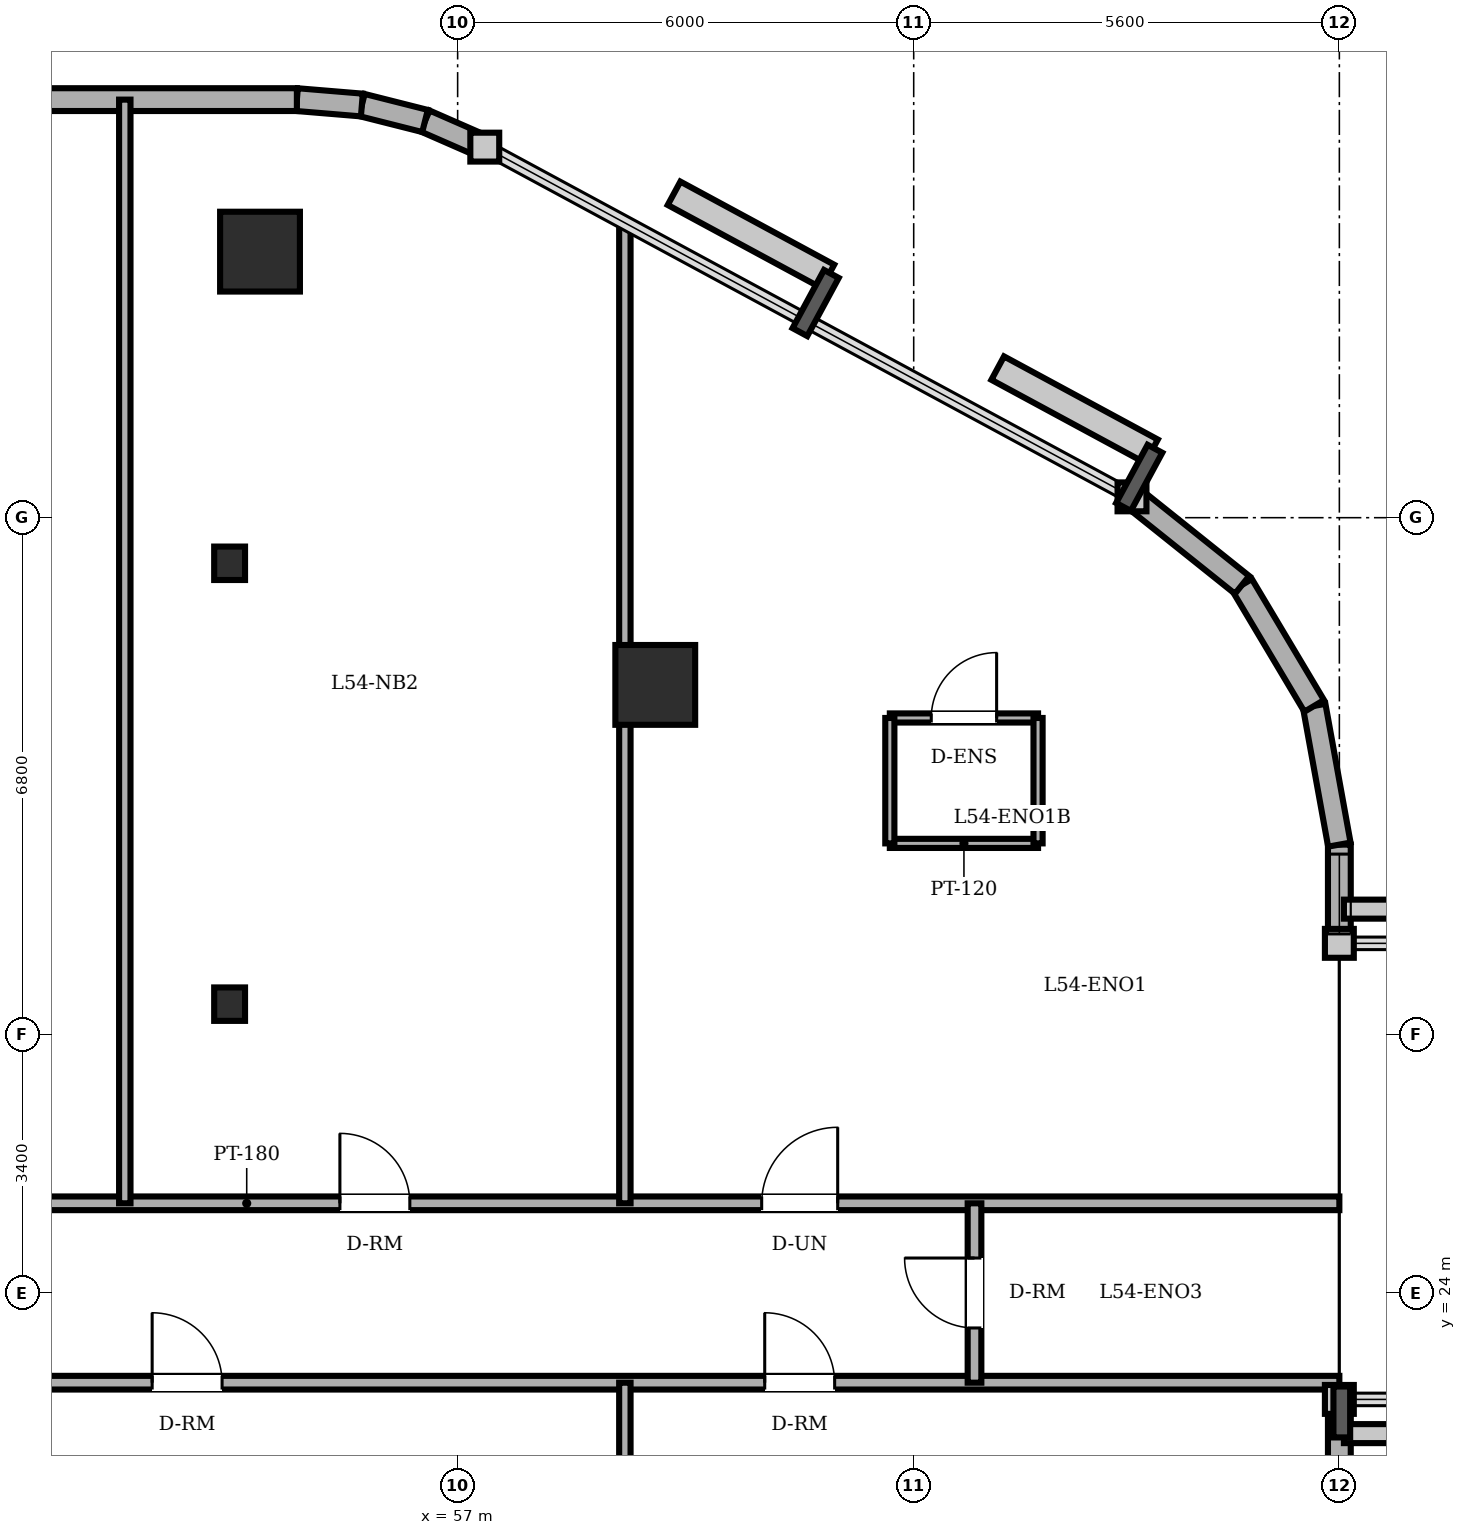
"""IFC4 building model, lengths in metres.
Left out: names, types, materials, properties, quantities, classifications, styles, units other than length and angle.
Written with IfcOpenShell. Run it as: python <this file> out.ifc"""

import sys

from ifc_helpers import new_model, si_unit, direction, frame, frame_2d, origin, origin_2d, place, context, subcontext, project, spatial, rectangle, circle, i_section, extrude, element, fill, save


model = new_model("IFC4")
c1 = context("Model", 3, precision=1e-05, world=origin(), true_north=direction((0.0, 1.0)))
c2 = subcontext(c1, "Body", "Model", "MODEL_VIEW")
j1 = project(units=[si_unit("LENGTHUNIT", "METRE"), si_unit("PLANEANGLEUNIT", "RADIAN")], contexts=[c1])
p1 = place(None, origin())
s1 = spatial("IfcSite", under=j1, at=p1, CompositionType="ELEMENT")
p2 = place(p1, origin())
s2 = spatial("IfcBuilding", under=s1, at=p2, CompositionType="ELEMENT")
p3 = place(p2, frame((0.0, 0.0, 208.5)))
s3 = spatial("IfcBuildingStorey", under=s2, at=p3, CompositionType="ELEMENT", Elevation=208.5)
for number, where, z_axis, x_axis in (
    (1, (59.6, 32.0, 0.0), (0.0, 0.0, 1.0), (1.0, 0.0, 0.0)),
    (2, (54.4, 37.7, 0.0), (0.0, 0.0, 1.0), (1.0, 0.0, 0.0)),
):
    element("IfcColumn", number, at=place(p3, frame(where, z_axis=z_axis, x_axis=x_axis)), inside=s3, PredefinedType="COLUMN", context=c2, shape_type="SweptSolid", body=[
        extrude(circle(Radius=0.525, at=origin_2d()), origin(), (0.0, 0.0, 1.0), 3.6),
    ])
for number, where, z_axis, x_axis in (
    (3, (54.0, 27.8, 0.0), (0.0, 0.0, 1.0), (1.0, 0.0, 0.0)),
    (4, (54.0, 33.6, 0.0), (0.0, 0.0, 1.0), (1.0, 0.0, 0.0)),
):
    element("IfcColumn", number, at=place(p3, frame(where, z_axis=z_axis, x_axis=x_axis)), inside=s3, PredefinedType="COLUMN", context=c2, shape_type="SweptSolid", body=[
        extrude(i_section(OverallWidth=0.406, OverallDepth=0.44, WebThickness=0.024, FlangeThickness=0.039, FilletRadius=0.015, at=origin_2d()), origin(), (0.0, 0.0, 1.0), 3.6),
    ])
p4 = place(p3, frame((68.6, 18.101, 0.0), z_axis=(0.0, 0.0, 1.0), x_axis=(0.0, 1.0, 0.0)))
e5 = element("IfcWall", 5, at=p4, inside=s3, PredefinedType="SOLIDWALL", context=c2, shape_type="SweptSolid", body=[
    extrude(rectangle(XDim=4.499, YDim=0.3, at=frame_2d((2.25, 0.0))), origin(), (0.0, 0.0, 1.0), 3.4),
])
p5 = place(p4, frame((1.725, 0.0, 0.85)))
e6 = element("IfcOpeningElement", 6, at=p5, cuts=e5, PredefinedType="OPENING", context=c2, shape_type="SweptSolid", body=[
    extrude(rectangle(XDim=1.05, YDim=1.55, at=frame_2d((0.525, 0.775))), frame((0.0, 0.16, 0.0), z_axis=(0.0, -1.0, 0.0), x_axis=(1.0, 0.0, 0.0)), (0.0, 0.0, 1.0), 0.32),
])
p6 = place(p3, frame((68.6, 28.6, 0.0), z_axis=(0.0, 0.0, 1.0), x_axis=(0.0, 1.0, 0.0)))
e7 = element("IfcWall", 7, at=p6, inside=s3, PredefinedType="SOLIDWALL", context=c2, shape_type="SweptSolid", body=[
    extrude(rectangle(XDim=1.299, YDim=0.3, at=frame_2d((0.649, 0.0))), origin(), (0.0, 0.0, 1.0), 3.4),
])
p7 = place(p6, frame((0.124, 0.0, 0.85)))
e8 = element("IfcOpeningElement", 8, at=p7, cuts=e7, PredefinedType="OPENING", context=c2, shape_type="SweptSolid", body=[
    extrude(rectangle(XDim=1.05, YDim=1.55, at=frame_2d((0.525, 0.775))), frame((0.0, 0.16, 0.0), z_axis=(0.0, -1.0, 0.0), x_axis=(1.0, 0.0, 0.0)), (0.0, 0.0, 1.0), 0.32),
])
p8 = place(p3, frame((68.6, 29.899, 0.0), z_axis=(0.0, 0.0, 1.0), x_axis=(-0.178468469252, 0.983945631365, 0.0)))
e9 = element("IfcWall", 9, at=p8, inside=s3, PredefinedType="SOLIDWALL", context=c2, shape_type="SweptSolid", body=[
    extrude(rectangle(XDim=1.855, YDim=0.3, at=frame_2d((0.927, 0.0))), origin(), (0.0, 0.0, 1.0), 3.4),
])
p9 = place(p3, frame((68.269, 31.724, 0.0), z_axis=(0.0, 0.0, 1.0), x_axis=(-0.512072018927, 0.858942516955, 0.0)))
e10 = element("IfcWall", 10, at=p9, inside=s3, PredefinedType="SOLIDWALL", context=c2, shape_type="SweptSolid", body=[
    extrude(rectangle(XDim=1.853, YDim=0.3, at=frame_2d((0.927, 0.0))), origin(), (0.0, 0.0, 1.0), 3.4),
])
p10 = place(p3, frame((67.32, 33.316, 0.0), z_axis=(0.0, 0.0, 1.0), x_axis=(-0.780920189257, 0.624630817372, 0.0)))
e11 = element("IfcWall", 11, at=p10, inside=s3, PredefinedType="SOLIDWALL", context=c2, shape_type="SweptSolid", body=[
    extrude(rectangle(XDim=1.854, YDim=0.3, at=frame_2d((0.927, 0.0))), origin(), (0.0, 0.0, 1.0), 3.4),
])
p11 = place(p3, frame((57.357, 39.075, 0.0), z_axis=(0.0, 0.0, 1.0), x_axis=(-0.916085473636, 0.400983048261, 0.0)))
e12 = element("IfcWall", 12, at=p11, inside=s3, PredefinedType="SOLIDWALL", context=c2, shape_type="SweptSolid", body=[
    extrude(rectangle(XDim=0.858, YDim=0.3, at=frame_2d((0.429, 0.0))), origin(), (0.0, 0.0, 1.0), 3.4),
])
p12 = place(p3, frame((56.571, 39.419, 0.0), z_axis=(0.0, 0.0, 1.0), x_axis=(-0.969536346338, 0.244947490555, 0.0)))
e13 = element("IfcWall", 13, at=p12, inside=s3, PredefinedType="SOLIDWALL", context=c2, shape_type="SweptSolid", body=[
    extrude(rectangle(XDim=0.857, YDim=0.3, at=frame_2d((0.429, 0.0))), origin(), (0.0, 0.0, 1.0), 3.4),
])
p13 = place(p3, frame((55.74, 39.629, 0.0), z_axis=(0.0, 0.0, 1.0), x_axis=(-0.996565355958, 0.082809971041, 0.0)))
e14 = element("IfcWall", 14, at=p13, inside=s3, PredefinedType="SOLIDWALL", context=c2, shape_type="SweptSolid", body=[
    extrude(rectangle(XDim=0.858, YDim=0.3, at=frame_2d((0.429, 0.0))), origin(), (0.0, 0.0, 1.0), 3.4),
])
p14 = place(p3, frame((54.885, 39.7, 0.0), z_axis=(0.0, 0.0, 1.0), x_axis=(-1.0, 0.0, 0.0)))
e15 = element("IfcWall", 15, at=p14, inside=s3, PredefinedType="SOLIDWALL", context=c2, shape_type="SweptSolid", body=[
    extrude(rectangle(XDim=32.485, YDim=0.3, at=frame_2d((16.243, 0.0))), origin(), (0.0, 0.0, 1.0), 3.4),
])
p15 = place(p14, frame((27.01, 0.0, 0.0)))
e16 = element("IfcOpeningElement", 16, at=p15, cuts=e15, PredefinedType="OPENING", context=c2, shape_type="SweptSolid", body=[
    extrude(rectangle(XDim=0.95, YDim=2.2, at=frame_2d((0.475, 1.1))), frame((0.0, 0.16, 0.0), z_axis=(0.0, -1.0, 0.0), x_axis=(1.0, 0.0, 0.0)), (0.0, 0.0, 1.0), 0.32),
])
p16 = place(p14, frame((5.846, 0.0, 0.85)))
e17 = element("IfcOpeningElement", 17, at=p16, cuts=e15, PredefinedType="OPENING", context=c2, shape_type="SweptSolid", body=[
    extrude(rectangle(XDim=1.35, YDim=1.55, at=frame_2d((0.675, 0.775))), frame((0.0, 0.16, 0.0), z_axis=(0.0, -1.0, 0.0), x_axis=(1.0, 0.0, 0.0)), (0.0, 0.0, 1.0), 0.32),
])
p17 = place(p14, frame((10.103, 0.0, 0.85)))
e18 = element("IfcOpeningElement", 18, at=p17, cuts=e15, PredefinedType="OPENING", context=c2, shape_type="SweptSolid", body=[
    extrude(rectangle(XDim=1.35, YDim=1.55, at=frame_2d((0.675, 0.775))), frame((0.0, 0.16, 0.0), z_axis=(0.0, -1.0, 0.0), x_axis=(1.0, 0.0, 0.0)), (0.0, 0.0, 1.0), 0.32),
])
p18 = place(p14, frame((16.577, 0.0, 0.85)))
e19 = element("IfcOpeningElement", 19, at=p18, cuts=e15, PredefinedType="OPENING", context=c2, shape_type="SweptSolid", body=[
    extrude(rectangle(XDim=1.35, YDim=1.55, at=frame_2d((0.675, 0.775))), frame((0.0, 0.16, 0.0), z_axis=(0.0, -1.0, 0.0), x_axis=(1.0, 0.0, 0.0)), (0.0, 0.0, 1.0), 0.32),
])
p19 = place(p14, frame((18.793, 0.0, 0.85)))
e20 = element("IfcOpeningElement", 20, at=p19, cuts=e15, PredefinedType="OPENING", context=c2, shape_type="SweptSolid", body=[
    extrude(rectangle(XDim=1.35, YDim=1.55, at=frame_2d((0.675, 0.775))), frame((0.0, 0.16, 0.0), z_axis=(0.0, -1.0, 0.0), x_axis=(1.0, 0.0, 0.0)), (0.0, 0.0, 1.0), 0.32),
])
p20 = place(p14, frame((22.91, 0.0, 0.85)))
e21 = element("IfcOpeningElement", 21, at=p20, cuts=e15, PredefinedType="OPENING", context=c2, shape_type="SweptSolid", body=[
    extrude(rectangle(XDim=1.35, YDim=1.55, at=frame_2d((0.675, 0.775))), frame((0.0, 0.16, 0.0), z_axis=(0.0, -1.0, 0.0), x_axis=(1.0, 0.0, 0.0)), (0.0, 0.0, 1.0), 0.32),
])
p21 = place(p14, frame((29.835, 0.0, 0.85)))
e22 = element("IfcOpeningElement", 22, at=p21, cuts=e15, PredefinedType="OPENING", context=c2, shape_type="SweptSolid", body=[
    extrude(rectangle(XDim=1.35, YDim=1.55, at=frame_2d((0.675, 0.775))), frame((0.0, 0.16, 0.0), z_axis=(0.0, -1.0, 0.0), x_axis=(1.0, 0.0, 0.0)), (0.0, 0.0, 1.0), 0.32),
])
p22 = place(p3, frame((62.686, 31.565, 0.0), z_axis=(0.0, 0.0, 1.0), x_axis=(1.0, 0.0, 0.0)))
e23 = element("IfcWall", 23, at=p22, inside=s3, PredefinedType="PARTITIONING", context=c2, shape_type="SweptSolid", body=[
    extrude(rectangle(XDim=1.95, YDim=0.12, at=frame_2d((0.975, 0.0))), origin(), (0.0, 0.0, 1.0), 3.4),
])
p23 = place(p22, frame((0.545, 0.0, 0.0)))
e24 = element("IfcOpeningElement", 24, at=p23, cuts=e23, PredefinedType="OPENING", context=c2, shape_type="SweptSolid", body=[
    extrude(rectangle(XDim=0.86, YDim=2.1, at=frame_2d((0.43, 1.05))), frame((0.0, 0.07, 0.0), z_axis=(0.0, -1.0, 0.0), x_axis=(1.0, 0.0, 0.0)), (0.0, 0.0, 1.0), 0.14),
])
p24 = place(p3, frame((64.636, 29.915, 0.0), z_axis=(0.0, 0.0, 1.0), x_axis=(-1.0, 0.0, 0.0)))
e25 = element("IfcWall", 25, at=p24, inside=s3, PredefinedType="PARTITIONING", context=c2, shape_type="SweptSolid", body=[
    extrude(rectangle(XDim=1.95, YDim=0.12, at=frame_2d((0.975, 0.0))), origin(), (0.0, 0.0, 1.0), 3.4),
])
for number, where, z_axis, x_axis in (
    (26, (62.686, 31.565, 0.0), (0.0, 0.0, 1.0), (0.0, -1.0, 0.0)),
    (27, (64.636, 29.915, 0.0), (0.0, 0.0, 1.0), (0.0, 1.0, 0.0)),
):
    element("IfcWall", number, at=place(p3, frame(where, z_axis=z_axis, x_axis=x_axis)), inside=s3, PredefinedType="PARTITIONING", context=c2, shape_type="SweptSolid", body=[
        extrude(rectangle(XDim=1.65, YDim=0.12, at=frame_2d((0.825, 0.0))), origin(), (0.0, 0.0, 1.0), 3.4),
    ])
p25 = place(p3, frame((39.85, 22.82, 0.0), z_axis=(0.0, 0.0, 1.0), x_axis=(1.0, 0.0, 0.0)))
e28 = element("IfcWall", 28, at=p25, inside=s3, PredefinedType="PARTITIONING", context=c2, shape_type="SweptSolid", body=[
    extrude(rectangle(XDim=28.75, YDim=0.18, at=frame_2d((14.375, 0.0))), origin(), (0.0, 0.0, 1.0), 3.4),
])
p26 = place(p25, frame((13.131, 0.0, 0.0)))
e29 = element("IfcOpeningElement", 29, at=p26, cuts=e28, PredefinedType="OPENING", context=c2, shape_type="SweptSolid", body=[
    extrude(rectangle(XDim=0.92, YDim=2.1, at=frame_2d((0.46, 1.05))), frame((0.0, 0.1, 0.0), z_axis=(0.0, -1.0, 0.0), x_axis=(1.0, 0.0, 0.0)), (0.0, 0.0, 1.0), 0.2),
])
p27 = place(p25, frame((21.19, 0.0, 0.0)))
e30 = element("IfcOpeningElement", 30, at=p27, cuts=e28, PredefinedType="OPENING", context=c2, shape_type="SweptSolid", body=[
    extrude(rectangle(XDim=0.92, YDim=2.1, at=frame_2d((0.46, 1.05))), frame((0.0, 0.1, 0.0), z_axis=(0.0, -1.0, 0.0), x_axis=(1.0, 0.0, 0.0)), (0.0, 0.0, 1.0), 0.2),
])
p28 = place(p3, frame((39.85, 25.18, 0.0), z_axis=(0.0, 0.0, 1.0), x_axis=(1.0, 0.0, 0.0)))
e31 = element("IfcWall", 31, at=p28, inside=s3, PredefinedType="PARTITIONING", context=c2, shape_type="SweptSolid", body=[
    extrude(rectangle(XDim=28.75, YDim=0.18, at=frame_2d((14.375, 0.0))), origin(), (0.0, 0.0, 1.0), 3.4),
])
p29 = place(p28, frame((6.185, 0.0, 0.0)))
e32 = element("IfcOpeningElement", 32, at=p29, cuts=e31, PredefinedType="OPENING", context=c2, shape_type="SweptSolid", body=[
    extrude(rectangle(XDim=0.92, YDim=2.1, at=frame_2d((0.46, 1.05))), frame((0.0, 0.1, 0.0), z_axis=(0.0, -1.0, 0.0), x_axis=(1.0, 0.0, 0.0)), (0.0, 0.0, 1.0), 0.2),
])
p30 = place(p28, frame((15.601, 0.0, 0.0)))
e33 = element("IfcOpeningElement", 33, at=p30, cuts=e31, PredefinedType="OPENING", context=c2, shape_type="SweptSolid", body=[
    extrude(rectangle(XDim=0.92, YDim=2.1, at=frame_2d((0.46, 1.05))), frame((0.0, 0.1, 0.0), z_axis=(0.0, -1.0, 0.0), x_axis=(1.0, 0.0, 0.0)), (0.0, 0.0, 1.0), 0.2),
])
p31 = place(p28, frame((21.15, 0.0, 0.0)))
e34 = element("IfcOpeningElement", 34, at=p31, cuts=e31, PredefinedType="OPENING", context=c2, shape_type="SweptSolid", body=[
    extrude(rectangle(XDim=1.0, YDim=2.15, at=frame_2d((0.5, 1.075))), frame((0.0, 0.1, 0.0), z_axis=(0.0, -1.0, 0.0), x_axis=(1.0, 0.0, 0.0)), (0.0, 0.0, 1.0), 0.2),
])
p32 = place(p3, frame((52.621, 25.18, 0.0), z_axis=(0.0, 0.0, 1.0), x_axis=(0.0, 1.0, 0.0)))
e35 = element("IfcWall", 35, at=p32, inside=s3, PredefinedType="PARTITIONING", context=c2, shape_type="SweptSolid", body=[
    extrude(rectangle(XDim=14.52, YDim=0.15, at=frame_2d((7.26, 0.0))), origin(), (0.0, 0.0, 1.0), 3.4),
])
for number, where, z_axis, x_axis in (
    (36, (59.2, 9.921, 0.0), (0.0, 0.0, 1.0), (0.0, 1.0, 0.0)),
    (37, (59.2, 25.18, 0.0), (0.0, 0.0, 1.0), (0.0, 1.0, 0.0)),
):
    element("IfcWall", number, at=place(p3, frame(where, z_axis=z_axis, x_axis=x_axis)), inside=s3, PredefinedType="PARTITIONING", context=c2, shape_type="SweptSolid", body=[
        extrude(rectangle(XDim=12.899, YDim=0.15, at=frame_2d((6.45, 0.0))), origin(), (0.0, 0.0, 1.0), 3.4),
    ])
p33 = place(p3, frame((63.8, 22.82, 0.0), z_axis=(0.0, 0.0, 1.0), x_axis=(0.0, 1.0, 0.0)))
e38 = element("IfcWall", 38, at=p33, inside=s3, PredefinedType="PARTITIONING", context=c2, shape_type="SweptSolid", body=[
    extrude(rectangle(XDim=2.36, YDim=0.18, at=frame_2d((1.18, 0.0))), origin(), (0.0, 0.0, 1.0), 3.4),
])
p34 = place(p33, frame((0.72, 0.0, 0.0)))
e39 = element("IfcOpeningElement", 39, at=p34, cuts=e38, PredefinedType="OPENING", context=c2, shape_type="SweptSolid", body=[
    extrude(rectangle(XDim=0.92, YDim=2.1, at=frame_2d((0.46, 1.05))), frame((0.0, 0.1, 0.0), z_axis=(0.0, -1.0, 0.0), x_axis=(1.0, 0.0, 0.0)), (0.0, 0.0, 1.0), 0.2),
])
p35 = place(p7, origin())
e40 = element("IfcWindow", 40, at=p35, inside=s3, PartitioningType="SINGLE_PANEL", PredefinedType="WINDOW", context=c2, shape_type="SweptSolid", body=[
    extrude(rectangle(XDim=1.05, YDim=1.55, at=frame_2d((0.525, 0.775))), frame((0.0, 0.03, 0.0), z_axis=(0.0, -1.0, 0.0), x_axis=(1.0, 0.0, 0.0)), (0.0, 0.0, 1.0), 0.06),
])
fill(e8, e40)
p36 = place(p23, origin())
e41 = element("IfcDoor", 41, at=p36, inside=s3, OperationType="SINGLE_SWING_RIGHT", PredefinedType="DOOR", context=c2, shape_type="SweptSolid", body=[
    extrude(rectangle(XDim=0.86, YDim=2.1, at=frame_2d((0.43, 1.05))), frame((0.0, 0.025, 0.0), z_axis=(0.0, -1.0, 0.0), x_axis=(1.0, 0.0, 0.0)), (0.0, 0.0, 1.0), 0.05),
])
fill(e24, e41)
p37 = place(p30, origin())
e42 = element("IfcDoor", 42, at=p37, inside=s3, OperationType="SINGLE_SWING_LEFT", PredefinedType="DOOR", context=c2, shape_type="SweptSolid", body=[
    extrude(rectangle(XDim=0.92, YDim=2.1, at=frame_2d((0.46, 1.05))), frame((0.0, 0.025, 0.0), z_axis=(0.0, -1.0, 0.0), x_axis=(1.0, 0.0, 0.0)), (0.0, 0.0, 1.0), 0.05),
])
fill(e33, e42)
p38 = place(p26, origin())
e43 = element("IfcDoor", 43, at=p38, inside=s3, OperationType="SINGLE_SWING_LEFT", PredefinedType="DOOR", context=c2, shape_type="SweptSolid", body=[
    extrude(rectangle(XDim=0.92, YDim=2.1, at=frame_2d((0.46, 1.05))), frame((0.0, 0.025, 0.0), z_axis=(0.0, -1.0, 0.0), x_axis=(1.0, 0.0, 0.0)), (0.0, 0.0, 1.0), 0.05),
])
fill(e29, e43)
p39 = place(p31, origin())
e44 = element("IfcDoor", 44, at=p39, inside=s3, OperationType="SINGLE_SWING_RIGHT", PredefinedType="DOOR", context=c2, shape_type="SweptSolid", body=[
    extrude(rectangle(XDim=1.0, YDim=2.15, at=frame_2d((0.5, 1.075))), frame((0.0, 0.025, 0.0), z_axis=(0.0, -1.0, 0.0), x_axis=(1.0, 0.0, 0.0)), (0.0, 0.0, 1.0), 0.05),
])
fill(e34, e44)
p40 = place(p27, origin())
e45 = element("IfcDoor", 45, at=p40, inside=s3, OperationType="SINGLE_SWING_LEFT", PredefinedType="DOOR", context=c2, shape_type="SweptSolid", body=[
    extrude(rectangle(XDim=0.92, YDim=2.1, at=frame_2d((0.46, 1.05))), frame((0.0, 0.025, 0.0), z_axis=(0.0, -1.0, 0.0), x_axis=(1.0, 0.0, 0.0)), (0.0, 0.0, 1.0), 0.05),
])
fill(e30, e45)
p41 = place(p34, origin())
e46 = element("IfcDoor", 46, at=p41, inside=s3, OperationType="SINGLE_SWING_RIGHT", PredefinedType="DOOR", context=c2, shape_type="SweptSolid", body=[
    extrude(rectangle(XDim=0.92, YDim=2.1, at=frame_2d((0.46, 1.05))), frame((0.0, 0.025, 0.0), z_axis=(0.0, -1.0, 0.0), x_axis=(1.0, 0.0, 0.0)), (0.0, 0.0, 1.0), 0.05),
])
fill(e39, e46)
save(model, sys.argv[1])
